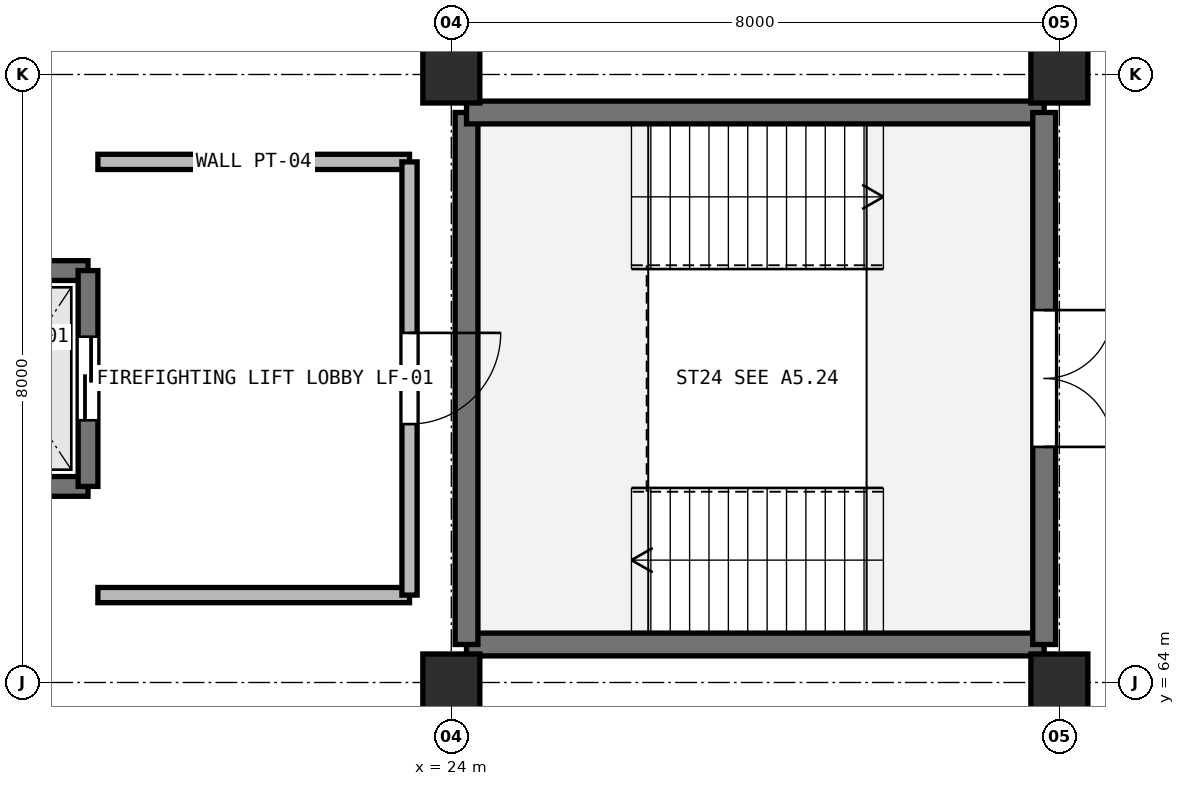
"""IFC4 building model, lengths in metres.
Left out: names, types, materials, properties, quantities, classifications, styles, units other than length and angle.
Written with IfcOpenShell. Run it as: python <this file> out.ifc"""

import sys

from ifc_helpers import new_model, si_unit, direction, frame, frame_2d, origin, origin_2d, place, context, subcontext, project, spatial, rectangle, extrude, element, fill, save


model = new_model("IFC4")
c1 = context("Model", 3, precision=1e-05, world=origin(), true_north=direction((0.0, 1.0)))
c2 = subcontext(c1, "Body", "Model", "MODEL_VIEW")
j1 = project(units=[si_unit("LENGTHUNIT", "METRE"), si_unit("PLANEANGLEUNIT", "RADIAN")], contexts=[c1])
p1 = place(None, origin())
s1 = spatial("IfcSite", under=j1, at=p1, CompositionType="ELEMENT")
p2 = place(p1, origin())
s2 = spatial("IfcBuilding", under=s1, at=p2, CompositionType="ELEMENT")
p3 = place(p2, frame((0.0, 0.0, -4.8)))
s3 = spatial("IfcBuildingStorey", under=s2, at=p3, CompositionType="ELEMENT", Elevation=-4.8)
for number, where, z_axis, x_axis in (
    (1, (24.0, 64.0, 0.0), (0.0, 0.0, 1.0), (1.0, 0.0, 0.0)),
    (2, (24.0, 72.0, 0.0), (0.0, 0.0, 1.0), (1.0, 0.0, 0.0)),
    (3, (32.0, 64.0, 0.0), (0.0, 0.0, 1.0), (1.0, 0.0, 0.0)),
    (4, (32.0, 72.0, 0.0), (0.0, 0.0, 1.0), (1.0, 0.0, 0.0)),
):
    element("IfcColumn", number, at=place(p3, frame(where, z_axis=z_axis, x_axis=x_axis)), inside=s3, PredefinedType="COLUMN", context=c2, shape_type="SweptSolid", body=[
        extrude(rectangle(XDim=0.75, YDim=0.75, at=origin_2d()), origin(), (0.0, 0.0, 1.0), 4.8),
    ])
p4 = place(p3, frame((31.8, 64.5, 0.0), z_axis=(0.0, 0.0, 1.0), x_axis=(-1.0, 0.0, 0.0)))
e5 = element("IfcWall", 5, at=p4, inside=s3, PredefinedType="SHEAR", context=c2, shape_type="SweptSolid", body=[
    extrude(rectangle(XDim=7.6, YDim=0.3, at=frame_2d((3.8, 0.0))), origin(), (0.0, 0.0, 1.0), 4.46),
])
p5 = place(p3, frame((24.2, 64.5, 0.0), z_axis=(0.0, 0.0, 1.0), x_axis=(0.0, 1.0, 0.0)))
e6 = element("IfcWall", 6, at=p5, inside=s3, PredefinedType="SHEAR", context=c2, shape_type="SweptSolid", body=[
    extrude(rectangle(XDim=7.0, YDim=0.3, at=frame_2d((3.5, 0.0))), origin(), (0.0, 0.0, 1.0), 4.46),
])
p6 = place(p3, frame((24.2, 71.5, 0.0), z_axis=(0.0, 0.0, 1.0), x_axis=(1.0, 0.0, 0.0)))
e7 = element("IfcWall", 7, at=p6, inside=s3, PredefinedType="SHEAR", context=c2, shape_type="SweptSolid", body=[
    extrude(rectangle(XDim=7.6, YDim=0.3, at=frame_2d((3.8, 0.0))), origin(), (0.0, 0.0, 1.0), 4.46),
])
p7 = place(p3, frame((31.8, 71.5, 0.0), z_axis=(0.0, 0.0, 1.0), x_axis=(0.0, -1.0, 0.0)))
e8 = element("IfcWall", 8, at=p7, inside=s3, PredefinedType="SHEAR", context=c2, shape_type="SweptSolid", body=[
    extrude(rectangle(XDim=7.0, YDim=0.3, at=frame_2d((3.5, 0.0))), origin(), (0.0, 0.0, 1.0), 4.46),
])
p8 = place(p7, frame((2.6, 0.0, 0.0)))
e9 = element("IfcOpeningElement", 9, at=p8, cuts=e8, PredefinedType="OPENING", context=c2, shape_type="SweptSolid", body=[
    extrude(rectangle(XDim=1.8, YDim=2.2, at=frame_2d((0.9, 1.1))), frame((0.0, 0.16, 0.0), z_axis=(0.0, -1.0, 0.0), x_axis=(1.0, 0.0, 0.0)), (0.0, 0.0, 1.0), 0.32),
])
for number, where, z_axis, x_axis in (
    (10, (17.18, 69.42, 0.0), (0.0, 0.0, 1.0), (1.0, 0.0, 0.0)),
    (11, (19.22, 66.58, 0.0), (0.0, 0.0, 1.0), (-1.0, 0.0, 0.0)),
):
    element("IfcWall", number, at=place(p3, frame(where, z_axis=z_axis, x_axis=x_axis)), inside=s3, PredefinedType="SHEAR", context=c2, shape_type="SweptSolid", body=[
        extrude(rectangle(XDim=2.04, YDim=0.26, at=frame_2d((1.02, 0.0))), origin(), (0.0, 0.0, 1.0), 4.46),
    ])
p9 = place(p3, frame((19.22, 69.42, 0.0), z_axis=(0.0, 0.0, 1.0), x_axis=(0.0, -1.0, 0.0)))
e12 = element("IfcWall", 12, at=p9, inside=s3, PredefinedType="SHEAR", context=c2, shape_type="SweptSolid", body=[
    extrude(rectangle(XDim=2.84, YDim=0.26, at=frame_2d((1.42, 0.0))), origin(), (0.0, 0.0, 1.0), 4.46),
])
p10 = place(p9, frame((0.87, 0.0, 0.0)))
e13 = element("IfcOpeningElement", 13, at=p10, cuts=e12, PredefinedType="OPENING", context=c2, shape_type="SweptSolid", body=[
    extrude(rectangle(XDim=1.1, YDim=2.15, at=frame_2d((0.55, 1.075))), frame((0.0, 0.14, 0.0), z_axis=(0.0, -1.0, 0.0), x_axis=(1.0, 0.0, 0.0)), (0.0, 0.0, 1.0), 0.28),
])
for number, where, z_axis, x_axis in (
    (14, (19.35, 70.85, 0.0), (0.0, 0.0, 1.0), (1.0, 0.0, 0.0)),
    (15, (23.45, 65.15, 0.0), (0.0, 0.0, 1.0), (-1.0, 0.0, 0.0)),
):
    element("IfcWall", number, at=place(p3, frame(where, z_axis=z_axis, x_axis=x_axis)), inside=s3, PredefinedType="PARTITIONING", context=c2, shape_type="SweptSolid", body=[
        extrude(rectangle(XDim=4.1, YDim=0.2, at=frame_2d((2.05, 0.0))), origin(), (0.0, 0.0, 1.0), 4.46),
    ])
p11 = place(p3, frame((23.45, 70.85, 0.0), z_axis=(0.0, 0.0, 1.0), x_axis=(0.0, -1.0, 0.0)))
e16 = element("IfcWall", 16, at=p11, inside=s3, PredefinedType="PARTITIONING", context=c2, shape_type="SweptSolid", body=[
    extrude(rectangle(XDim=5.7, YDim=0.2, at=frame_2d((2.85, 0.0))), origin(), (0.0, 0.0, 1.0), 3.45),
])
p12 = place(p11, frame((2.25, 0.0, 0.0)))
e17 = element("IfcOpeningElement", 17, at=p12, cuts=e16, PredefinedType="OPENING", context=c2, shape_type="SweptSolid", body=[
    extrude(rectangle(XDim=1.2, YDim=2.2, at=frame_2d((0.6, 1.1))), frame((0.0, 0.11, 0.0), z_axis=(0.0, -1.0, 0.0), x_axis=(1.0, 0.0, 0.0)), (0.0, 0.0, 1.0), 0.22),
])
p13 = place(p8, frame((1.8, 0.0, 0.0), z_axis=(0.0, 0.0, 1.0), x_axis=(-1.0, 0.0, 0.0)))
e18 = element("IfcDoor", 18, at=p13, inside=s3, OperationType="DOUBLE_DOOR_SINGLE_SWING", PredefinedType="DOOR", context=c2, shape_type="SweptSolid", body=[
    extrude(rectangle(XDim=1.8, YDim=2.2, at=frame_2d((0.9, 1.1))), frame((0.0, 0.025, 0.0), z_axis=(0.0, -1.0, 0.0), x_axis=(1.0, 0.0, 0.0)), (0.0, 0.0, 1.0), 0.05),
])
fill(e9, e18)
p14 = place(p10, origin())
e19 = element("IfcDoor", 19, at=p14, inside=s3, OperationType="SLIDING_TO_LEFT", PredefinedType="DOOR", context=c2, shape_type="SweptSolid", body=[
    extrude(rectangle(XDim=1.1, YDim=2.15, at=frame_2d((0.55, 1.075))), frame((0.0, 0.025, 0.0), z_axis=(0.0, -1.0, 0.0), x_axis=(1.0, 0.0, 0.0)), (0.0, 0.0, 1.0), 0.05),
])
fill(e13, e19)
p15 = place(p12, origin())
e20 = element("IfcDoor", 20, at=p15, inside=s3, OperationType="SINGLE_SWING_LEFT", PredefinedType="DOOR", context=c2, shape_type="SweptSolid", body=[
    extrude(rectangle(XDim=1.2, YDim=2.2, at=frame_2d((0.6, 1.1))), frame((0.0, 0.025, 0.0), z_axis=(0.0, -1.0, 0.0), x_axis=(1.0, 0.0, 0.0)), (0.0, 0.0, 1.0), 0.05),
])
fill(e17, e20)
save(model, sys.argv[1])
